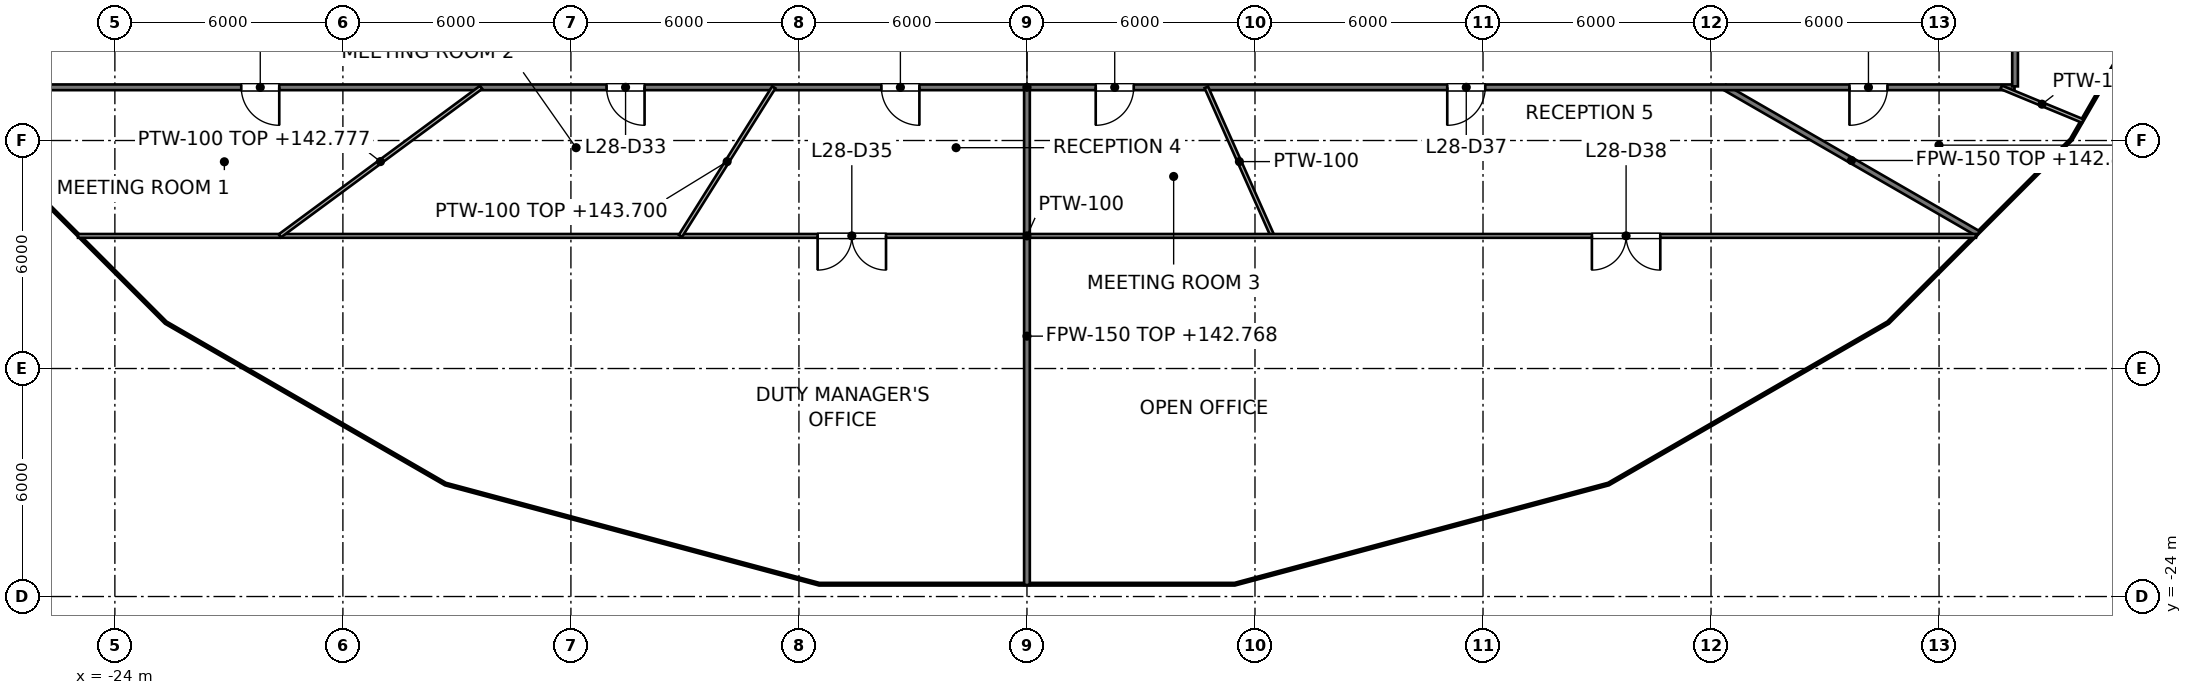
"""IFC4 building model, lengths in metres.
Left out: names, types, materials, properties, quantities, classifications, styles, units other than length and angle.
Written with IfcOpenShell. Run it as: python <this file> out.ifc"""

import sys

from ifc_helpers import new_model, si_unit, direction, frame, frame_2d, origin, place, context, subcontext, project, spatial, rectangle, extrude, element, fill, save


model = new_model("IFC4")
c1 = context("Model", 3, precision=1e-05, world=origin(), true_north=direction((0.0, 1.0)))
c2 = subcontext(c1, "Body", "Model", "MODEL_VIEW")
j1 = project(units=[si_unit("LENGTHUNIT", "METRE"), si_unit("PLANEANGLEUNIT", "RADIAN")], contexts=[c1])
p1 = place(None, origin())
s1 = spatial("IfcSite", under=j1, at=p1, CompositionType="ELEMENT")
p2 = place(p1, origin())
s2 = spatial("IfcBuilding", under=s1, at=p2, CompositionType="ELEMENT")
p3 = place(p2, frame((0.0, 0.0, 139.8)))
s3 = spatial("IfcBuildingStorey", under=s2, at=p3, CompositionType="ELEMENT", Elevation=139.8)
p4 = place(p3, frame((18.359, -10.6, 0.0), z_axis=(0.0, 0.0, 1.0), x_axis=(0.866036201792, -0.499981296836, 0.0)))
e1 = element("IfcWall", 1, at=p4, inside=s3, PredefinedType="PARTITIONING", context=c2, shape_type="SweptSolid", body=[
    extrude(rectangle(XDim=7.702, YDim=0.15, at=frame_2d((3.851, 0.0))), origin(), (0.0, 0.0, 1.0), 3.045),
])
p5 = place(p3, frame((-25.986, -10.6, 0.0), z_axis=(0.0, 0.0, 1.0), x_axis=(1.0, 0.0, 0.0)))
e2 = element("IfcWall", 2, at=p5, inside=s3, PredefinedType="PARTITIONING", context=c2, shape_type="SweptSolid", body=[
    extrude(rectangle(XDim=51.972, YDim=0.15, at=frame_2d((25.986, 0.0))), origin(), (0.0, 0.0, 1.0), 2.968),
])
p6 = place(p5, frame((47.628, 0.0, 0.0)))
e3 = element("IfcOpeningElement", 3, at=p6, cuts=e2, PredefinedType="OPENING", context=c2, shape_type="SweptSolid", body=[
    extrude(rectangle(XDim=1.0, YDim=2.1, at=frame_2d((0.5, 1.05))), frame((0.0, 0.075, 0.0), z_axis=(0.0, -1.0, 0.0), x_axis=(1.0, 0.0, 0.0)), (0.0, 0.0, 1.0), 0.15),
])
p7 = place(p5, frame((5.312, 0.0, 0.0)))
e4 = element("IfcOpeningElement", 4, at=p7, cuts=e2, PredefinedType="OPENING", context=c2, shape_type="SweptSolid", body=[
    extrude(rectangle(XDim=1.0, YDim=2.1, at=frame_2d((0.5, 1.05))), frame((0.0, 0.075, 0.0), z_axis=(0.0, -1.0, 0.0), x_axis=(1.0, 0.0, 0.0)), (0.0, 0.0, 1.0), 0.15),
])
p8 = place(p5, frame((14.924, 0.0, 0.0)))
e5 = element("IfcOpeningElement", 5, at=p8, cuts=e2, PredefinedType="OPENING", context=c2, shape_type="SweptSolid", body=[
    extrude(rectangle(XDim=1.0, YDim=2.1, at=frame_2d((0.5, 1.05))), frame((0.0, 0.075, 0.0), z_axis=(0.0, -1.0, 0.0), x_axis=(1.0, 0.0, 0.0)), (0.0, 0.0, 1.0), 0.15),
])
p9 = place(p5, frame((22.156, 0.0, 0.0)))
e6 = element("IfcOpeningElement", 6, at=p9, cuts=e2, PredefinedType="OPENING", context=c2, shape_type="SweptSolid", body=[
    extrude(rectangle(XDim=1.0, YDim=2.1, at=frame_2d((0.5, 1.05))), frame((0.0, 0.075, 0.0), z_axis=(0.0, -1.0, 0.0), x_axis=(1.0, 0.0, 0.0)), (0.0, 0.0, 1.0), 0.15),
])
p10 = place(p5, frame((27.795, 0.0, 0.0)))
e7 = element("IfcOpeningElement", 7, at=p10, cuts=e2, PredefinedType="OPENING", context=c2, shape_type="SweptSolid", body=[
    extrude(rectangle(XDim=1.0, YDim=2.1, at=frame_2d((0.5, 1.05))), frame((0.0, 0.075, 0.0), z_axis=(0.0, -1.0, 0.0), x_axis=(1.0, 0.0, 0.0)), (0.0, 0.0, 1.0), 0.15),
])
p11 = place(p5, frame((37.045, 0.0, 0.0)))
e8 = element("IfcOpeningElement", 8, at=p11, cuts=e2, PredefinedType="OPENING", context=c2, shape_type="SweptSolid", body=[
    extrude(rectangle(XDim=1.0, YDim=2.1, at=frame_2d((0.5, 1.05))), frame((0.0, 0.075, 0.0), z_axis=(0.0, -1.0, 0.0), x_axis=(1.0, 0.0, 0.0)), (0.0, 0.0, 1.0), 0.15),
])
p12 = place(p3, frame((26.0, -10.575, 0.0), z_axis=(0.0, 0.0, 1.0), x_axis=(0.0, 1.0, 0.0)))
e9 = element("IfcWall", 9, at=p12, inside=s3, PredefinedType="PARTITIONING", context=c2, shape_type="SweptSolid", body=[
    extrude(rectangle(XDim=2.775, YDim=0.15, at=frame_2d((1.387, 0.0))), origin(), (0.0, 0.0, 1.0), 2.977),
])
p13 = place(p3, frame((0.0, -23.696, 0.0), z_axis=(0.0, 0.0, 1.0), x_axis=(0.0, 1.0, 0.0)))
e10 = element("IfcWall", 10, at=p13, inside=s3, PredefinedType="PARTITIONING", context=c2, shape_type="SweptSolid", body=[
    extrude(rectangle(XDim=13.096, YDim=0.15, at=frame_2d((6.548, 0.0))), origin(), (0.0, 0.0, 1.0), 2.968),
])
p14 = place(p3, frame((4.719, -10.6, 0.0), z_axis=(0.0, 0.0, 1.0), x_axis=(0.406768186446, -0.913531412977, 0.0)))
e11 = element("IfcWall", 11, at=p14, inside=s3, PredefinedType="PARTITIONING", context=c2, shape_type="SweptSolid", body=[
    extrude(rectangle(XDim=4.28, YDim=0.1, at=frame_2d((2.14, 0.0))), origin(), (0.0, 0.0, 1.0), 2.968),
])
p15 = place(p3, frame((25.635, -10.6, 0.0), z_axis=(0.0, 0.0, 1.0), x_axis=(0.924087226733, -0.382181628796, 0.0)))
e12 = element("IfcWall", 12, at=p15, inside=s3, PredefinedType="PARTITIONING", context=c2, shape_type="SweptSolid", body=[
    extrude(rectangle(XDim=2.323, YDim=0.1, at=frame_2d((1.162, 0.0))), origin(), (0.0, 0.0, 1.0), 3.525),
])
p16 = place(p3, frame((-24.97, -14.51, 0.0), z_axis=(0.0, 0.0, 1.0), x_axis=(1.0, 0.0, 0.0)))
e13 = element("IfcWall", 13, at=p16, inside=s3, PredefinedType="PARTITIONING", context=c2, shape_type="SweptSolid", body=[
    extrude(rectangle(XDim=49.94, YDim=0.1, at=frame_2d((24.97, 0.0))), origin(), (0.0, 0.0, 1.0), 2.968),
])
p17 = place(p16, frame((19.461, 0.0, 0.0)))
e14 = element("IfcOpeningElement", 14, at=p17, cuts=e13, PredefinedType="OPENING", context=c2, shape_type="SweptSolid", body=[
    extrude(rectangle(XDim=1.8, YDim=2.1, at=frame_2d((0.9, 1.05))), frame((0.0, 0.05, 0.0), z_axis=(0.0, -1.0, 0.0), x_axis=(1.0, 0.0, 0.0)), (0.0, 0.0, 1.0), 0.1),
])
p18 = place(p16, frame((39.835, 0.0, 0.0)))
e15 = element("IfcOpeningElement", 15, at=p18, cuts=e13, PredefinedType="OPENING", context=c2, shape_type="SweptSolid", body=[
    extrude(rectangle(XDim=1.8, YDim=2.1, at=frame_2d((0.9, 1.05))), frame((0.0, 0.05, 0.0), z_axis=(0.0, -1.0, 0.0), x_axis=(1.0, 0.0, 0.0)), (0.0, 0.0, 1.0), 0.1),
])
p19 = place(p3, frame((-19.661, -14.51, 0.0), z_axis=(0.0, 0.0, 1.0), x_axis=(0.804603605329, 0.593812292136, 0.0)))
e16 = element("IfcWall", 16, at=p19, inside=s3, PredefinedType="PARTITIONING", context=c2, shape_type="SweptSolid", body=[
    extrude(rectangle(XDim=6.584, YDim=0.1, at=frame_2d((3.292, 0.0))), origin(), (0.0, 0.0, 1.0), 2.977),
])
p20 = place(p3, frame((-9.117, -14.51, 0.0), z_axis=(0.0, 0.0, 1.0), x_axis=(0.531922462086, 0.846793064643, 0.0)))
e17 = element("IfcWall", 17, at=p20, inside=s3, PredefinedType="PARTITIONING", context=c2, shape_type="SweptSolid", body=[
    extrude(rectangle(XDim=4.617, YDim=0.1, at=frame_2d((2.309, 0.0))), origin(), (0.0, 0.0, 1.0), 3.9),
])
p21 = place(p6, origin())
e18 = element("IfcDoor", 18, at=p21, inside=s3, OperationType="SINGLE_SWING_LEFT", PredefinedType="DOOR", context=c2, shape_type="SweptSolid", body=[
    extrude(rectangle(XDim=1.0, YDim=2.1, at=frame_2d((0.5, 1.05))), frame((0.0, 0.025, 0.0), z_axis=(0.0, -1.0, 0.0), x_axis=(1.0, 0.0, 0.0)), (0.0, 0.0, 1.0), 0.05),
])
fill(e3, e18)
p22 = place(p7, origin())
e19 = element("IfcDoor", 19, at=p22, inside=s3, OperationType="SINGLE_SWING_RIGHT", PredefinedType="DOOR", context=c2, shape_type="SweptSolid", body=[
    extrude(rectangle(XDim=1.0, YDim=2.1, at=frame_2d((0.5, 1.05))), frame((0.0, 0.025, 0.0), z_axis=(0.0, -1.0, 0.0), x_axis=(1.0, 0.0, 0.0)), (0.0, 0.0, 1.0), 0.05),
])
fill(e4, e19)
p23 = place(p8, origin())
e20 = element("IfcDoor", 20, at=p23, inside=s3, OperationType="SINGLE_SWING_RIGHT", PredefinedType="DOOR", context=c2, shape_type="SweptSolid", body=[
    extrude(rectangle(XDim=1.0, YDim=2.1, at=frame_2d((0.5, 1.05))), frame((0.0, 0.025, 0.0), z_axis=(0.0, -1.0, 0.0), x_axis=(1.0, 0.0, 0.0)), (0.0, 0.0, 1.0), 0.05),
])
fill(e5, e20)
p24 = place(p9, origin())
e21 = element("IfcDoor", 21, at=p24, inside=s3, OperationType="SINGLE_SWING_RIGHT", PredefinedType="DOOR", context=c2, shape_type="SweptSolid", body=[
    extrude(rectangle(XDim=1.0, YDim=2.1, at=frame_2d((0.5, 1.05))), frame((0.0, 0.025, 0.0), z_axis=(0.0, -1.0, 0.0), x_axis=(1.0, 0.0, 0.0)), (0.0, 0.0, 1.0), 0.05),
])
fill(e6, e21)
p25 = place(p17, origin())
e22 = element("IfcDoor", 22, at=p25, inside=s3, OperationType="DOUBLE_DOOR_SINGLE_SWING", PredefinedType="DOOR", context=c2, shape_type="SweptSolid", body=[
    extrude(rectangle(XDim=1.8, YDim=2.1, at=frame_2d((0.9, 1.05))), frame((0.0, 0.025, 0.0), z_axis=(0.0, -1.0, 0.0), x_axis=(1.0, 0.0, 0.0)), (0.0, 0.0, 1.0), 0.05),
])
fill(e14, e22)
p26 = place(p10, origin())
e23 = element("IfcDoor", 23, at=p26, inside=s3, OperationType="SINGLE_SWING_LEFT", PredefinedType="DOOR", context=c2, shape_type="SweptSolid", body=[
    extrude(rectangle(XDim=1.0, YDim=2.1, at=frame_2d((0.5, 1.05))), frame((0.0, 0.025, 0.0), z_axis=(0.0, -1.0, 0.0), x_axis=(1.0, 0.0, 0.0)), (0.0, 0.0, 1.0), 0.05),
])
fill(e7, e23)
p27 = place(p11, origin())
e24 = element("IfcDoor", 24, at=p27, inside=s3, OperationType="SINGLE_SWING_LEFT", PredefinedType="DOOR", context=c2, shape_type="SweptSolid", body=[
    extrude(rectangle(XDim=1.0, YDim=2.1, at=frame_2d((0.5, 1.05))), frame((0.0, 0.025, 0.0), z_axis=(0.0, -1.0, 0.0), x_axis=(1.0, 0.0, 0.0)), (0.0, 0.0, 1.0), 0.05),
])
fill(e8, e24)
p28 = place(p18, origin())
e25 = element("IfcDoor", 25, at=p28, inside=s3, OperationType="DOUBLE_DOOR_SINGLE_SWING", PredefinedType="DOOR", context=c2, shape_type="SweptSolid", body=[
    extrude(rectangle(XDim=1.8, YDim=2.1, at=frame_2d((0.9, 1.05))), frame((0.0, 0.025, 0.0), z_axis=(0.0, -1.0, 0.0), x_axis=(1.0, 0.0, 0.0)), (0.0, 0.0, 1.0), 0.05),
])
fill(e15, e25)
save(model, sys.argv[1])
